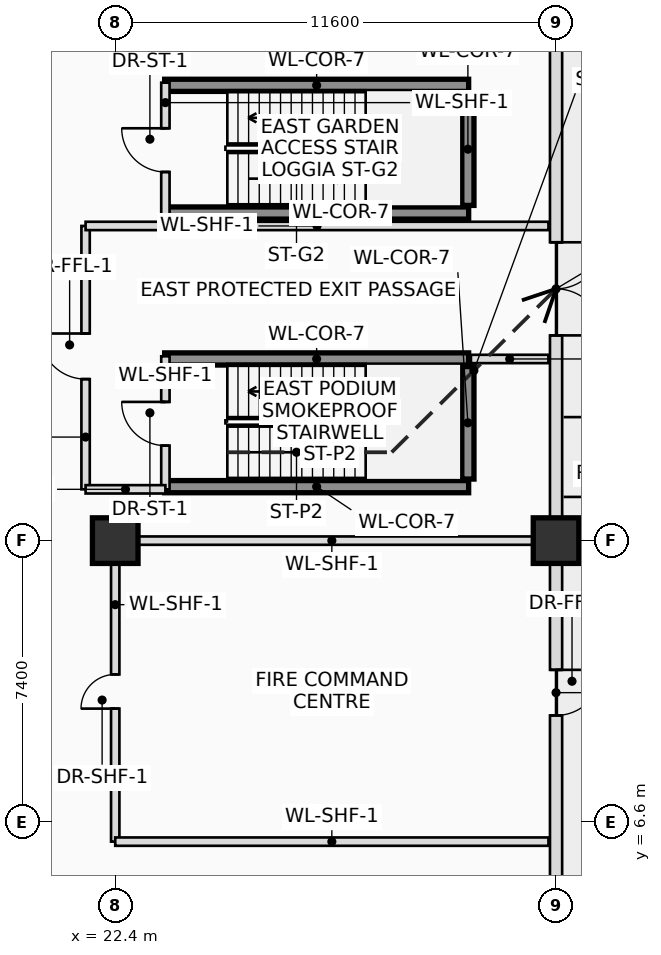
"""IFC4 building model, lengths in metres.
Left out: names, types, materials, properties, quantities, classifications, styles, units other than length and angle.
Written with IfcOpenShell. Run it as: python <this file> out.ifc"""

import sys

from ifc_helpers import new_model, si_unit, direction, frame, frame_2d, origin, origin_2d, place, context, subcontext, project, spatial, rectangle, extrude, source, transform, mapped, element, fill, save


model = new_model("IFC4")
c1 = context("Model", 3, precision=1e-05, world=origin(), true_north=direction((0.0, 1.0)))
c2 = subcontext(c1, "Body", "Model", "MODEL_VIEW")
j1 = project(units=[si_unit("LENGTHUNIT", "METRE"), si_unit("PLANEANGLEUNIT", "RADIAN")], contexts=[c1])
p1 = place(None, origin())
s1 = spatial("IfcSite", under=j1, at=p1, CompositionType="ELEMENT")
p2 = place(p1, origin())
s2 = spatial("IfcBuilding", under=s1, at=p2, CompositionType="ELEMENT")
p3 = place(p2, origin())
s3 = spatial("IfcBuildingStorey", under=s2, at=p3, CompositionType="ELEMENT", Elevation=0.0)
for number, where, z_axis, x_axis in (
    (1, (23.7, 18.78, 0.0), (0.0, 0.0, 1.0), (1.0, 0.0, 0.0)),
    (2, (23.7, 15.42, 0.0), (0.0, 0.0, 1.0), (1.0, 0.0, 0.0)),
):
    element("IfcWall", number, at=place(p3, frame(where, z_axis=z_axis, x_axis=x_axis)), inside=s3, PredefinedType="SHEAR", context=c2, shape_type="SweptSolid", body=[
        extrude(rectangle(XDim=8.0, YDim=0.32, at=frame_2d((4.0, 0.0))), origin(), (0.0, 0.0, 1.0), 4.5),
    ])
p4 = place(p3, frame((31.68, 15.62, 0.0), z_axis=(0.0, 0.0, 1.0), x_axis=(0.0, 1.0, 0.0)))
e3 = element("IfcWall", 3, at=p4, inside=s3, PredefinedType="SHEAR", context=c2, shape_type="SweptSolid", body=[
    extrude(rectangle(XDim=2.96, YDim=0.32, at=frame_2d((1.48, 0.0))), origin(), (0.0, 0.0, 1.0), 4.5),
])
for number, where, z_axis, x_axis in (
    (4, (23.7, 25.98, 0.0), (0.0, 0.0, 1.0), (1.0, 0.0, 0.0)),
    (5, (23.7, 22.62, 0.0), (0.0, 0.0, 1.0), (1.0, 0.0, 0.0)),
):
    element("IfcWall", number, at=place(p3, frame(where, z_axis=z_axis, x_axis=x_axis)), inside=s3, PredefinedType="SHEAR", context=c2, shape_type="SweptSolid", body=[
        extrude(rectangle(XDim=8.0, YDim=0.32, at=frame_2d((4.0, 0.0))), origin(), (0.0, 0.0, 1.0), 4.5),
    ])
p5 = place(p3, frame((31.68, 22.82, 0.0), z_axis=(0.0, 0.0, 1.0), x_axis=(0.0, 1.0, 0.0)))
e6 = element("IfcWall", 6, at=p5, inside=s3, PredefinedType="SHEAR", context=c2, shape_type="SweptSolid", body=[
    extrude(rectangle(XDim=2.96, YDim=0.32, at=frame_2d((1.48, 0.0))), origin(), (0.0, 0.0, 1.0), 4.5),
])
m1 = source(origin(), c2, "Body", "SweptSolid", [
    extrude(rectangle(XDim=1.2, YDim=1.2, at=origin_2d()), origin(), (0.0, 0.0, 1.0), 4.5),
])
for number, where, z_axis, x_axis in (
    (7, (22.4, 14.0, 0.0), (0.0, 0.0, 1.0), (1.0, 0.0, 0.0)),
    (8, (34.0, 14.0, 0.0), (0.0, 0.0, 1.0), (1.0, 0.0, 0.0)),
):
    element("IfcColumn", number, at=place(p3, frame(where, z_axis=z_axis, x_axis=x_axis)), inside=s3, PredefinedType="COLUMN", context=c2, shape_type="MappedRepresentation", body=[
        mapped(m1, transform((0.0, 0.0, 0.0), scale=1.0)),
    ])
p6 = place(p3, frame((34.0, 29.5, 0.0), z_axis=(0.0, 0.0, 1.0), x_axis=(0.0, -1.0, 0.0)))
e9 = element("IfcWall", 9, at=p6, inside=s3, PredefinedType="SOLIDWALL", context=c2, shape_type="SweptSolid", body=[
    extrude(rectangle(XDim=57.0, YDim=0.32, at=frame_2d((28.5, 0.0))), origin(), (0.0, 0.0, 1.0), 3.25),
])
p7 = place(p6, frame((7.65, 0.0, 0.0)))
e10 = element("IfcOpeningElement", 10, at=p7, cuts=e9, PredefinedType="OPENING", context=c2, shape_type="SweptSolid", body=[
    extrude(rectangle(XDim=2.45, YDim=2.55, at=frame_2d((1.225, 1.275))), frame((0.0, 0.17, 0.0), z_axis=(0.0, -1.0, 0.0), x_axis=(1.0, 0.0, 0.0)), (0.0, 0.0, 1.0), 0.34),
])
p8 = place(p6, frame((25.0, 0.0, 0.0)))
e11 = element("IfcOpeningElement", 11, at=p8, cuts=e9, PredefinedType="OPENING", context=c2, shape_type="SweptSolid", body=[
    extrude(rectangle(XDim=2.5, YDim=2.6, at=frame_2d((1.25, 1.3))), frame((0.0, 0.17, 0.0), z_axis=(0.0, -1.0, 0.0), x_axis=(1.0, 0.0, 0.0)), (0.0, 0.0, 1.0), 0.34),
])
p9 = place(p6, frame((18.9, 0.0, 0.0)))
e12 = element("IfcOpeningElement", 12, at=p9, cuts=e9, PredefinedType="OPENING", context=c2, shape_type="SweptSolid", body=[
    extrude(rectangle(XDim=1.2, YDim=2.2, at=frame_2d((0.6, 1.1))), frame((0.0, 0.17, 0.0), z_axis=(0.0, -1.0, 0.0), x_axis=(1.0, 0.0, 0.0)), (0.0, 0.0, 1.0), 0.34),
])
p10 = place(p6, frame((50.5, 0.0, 0.0)))
e13 = element("IfcOpeningElement", 13, at=p10, cuts=e9, PredefinedType="OPENING", context=c2, shape_type="SweptSolid", body=[
    extrude(rectangle(XDim=4.2, YDim=2.8, at=frame_2d((2.1, 1.4))), frame((0.0, 0.17, 0.0), z_axis=(0.0, -1.0, 0.0), x_axis=(1.0, 0.0, 0.0)), (0.0, 0.0, 1.0), 0.34),
])
p11 = place(p6, frame((35.0, 0.0, 0.4)))
e14 = element("IfcOpeningElement", 14, at=p11, cuts=e9, PredefinedType="OPENING", context=c2, shape_type="SweptSolid", body=[
    extrude(rectangle(XDim=2.4, YDim=2.4, at=frame_2d((1.2, 1.2))), frame((0.0, 0.17, 0.0), z_axis=(0.0, -1.0, 0.0), x_axis=(1.0, 0.0, 0.0)), (0.0, 0.0, 1.0), 0.34),
])
p12 = place(p3, frame((23.72, 15.35, 0.0), z_axis=(0.0, 0.0, 1.0), x_axis=(0.0, 1.0, 0.0)))
e15 = element("IfcWall", 15, at=p12, inside=s3, PredefinedType="PLUMBINGWALL", context=c2, shape_type="SweptSolid", body=[
    extrude(rectangle(XDim=3.5, YDim=0.22, at=frame_2d((1.75, 0.0))), origin(), (0.0, 0.0, 1.0), 4.17),
])
p13 = place(p12, frame((1.15, 0.0, 0.0)))
e16 = element("IfcOpeningElement", 16, at=p13, cuts=e15, PredefinedType="OPENING", context=c2, shape_type="SweptSolid", body=[
    extrude(rectangle(XDim=1.15, YDim=2.15, at=frame_2d((0.575, 1.075))), frame((0.0, 0.12, 0.0), z_axis=(0.0, -1.0, 0.0), x_axis=(1.0, 0.0, 0.0)), (0.0, 0.0, 1.0), 0.24),
])
p14 = place(p3, frame((23.72, 22.55, 0.0), z_axis=(0.0, 0.0, 1.0), x_axis=(0.0, 1.0, 0.0)))
e17 = element("IfcWall", 17, at=p14, inside=s3, PredefinedType="PLUMBINGWALL", context=c2, shape_type="SweptSolid", body=[
    extrude(rectangle(XDim=3.5, YDim=0.22, at=frame_2d((1.75, 0.0))), origin(), (0.0, 0.0, 1.0), 4.17),
])
p15 = place(p14, frame((1.15, 0.0, 0.0)))
e18 = element("IfcOpeningElement", 18, at=p15, cuts=e17, PredefinedType="OPENING", context=c2, shape_type="SweptSolid", body=[
    extrude(rectangle(XDim=1.15, YDim=2.15, at=frame_2d((0.575, 1.075))), frame((0.0, 0.12, 0.0), z_axis=(0.0, -1.0, 0.0), x_axis=(1.0, 0.0, 0.0)), (0.0, 0.0, 1.0), 0.24),
])
p16 = place(p3, frame((21.62, 15.35, 0.0), z_axis=(0.0, 0.0, 1.0), x_axis=(0.0, 1.0, 0.0)))
e19 = element("IfcWall", 19, at=p16, inside=s3, PredefinedType="PLUMBINGWALL", context=c2, shape_type="SweptSolid", body=[
    extrude(rectangle(XDim=6.93, YDim=0.22, at=frame_2d((3.465, 0.0))), origin(), (0.0, 0.0, 1.0), 4.17),
])
p17 = place(p16, frame((2.9, 0.0, 0.0)))
e20 = element("IfcOpeningElement", 20, at=p17, cuts=e19, PredefinedType="OPENING", context=c2, shape_type="SweptSolid", body=[
    extrude(rectangle(XDim=1.2, YDim=2.2, at=frame_2d((0.6, 1.1))), frame((0.0, 0.12, 0.0), z_axis=(0.0, -1.0, 0.0), x_axis=(1.0, 0.0, 0.0)), (0.0, 0.0, 1.0), 0.24),
])
p18 = place(p3, frame((21.62, 15.35, 0.0), z_axis=(0.0, 0.0, 1.0), x_axis=(1.0, 0.0, 0.0)))
e21 = element("IfcWall", 21, at=p18, inside=s3, PredefinedType="PLUMBINGWALL", context=c2, shape_type="SweptSolid", body=[
    extrude(rectangle(XDim=2.1, YDim=0.22, at=frame_2d((1.05, 0.0))), origin(), (0.0, 0.0, 1.0), 3.375),
])
p19 = place(p3, frame((31.76, 18.78, 0.0), z_axis=(0.0, 0.0, 1.0), x_axis=(1.0, 0.0, 0.0)))
e22 = element("IfcWall", 22, at=p19, inside=s3, PredefinedType="PLUMBINGWALL", context=c2, shape_type="SweptSolid", body=[
    extrude(rectangle(XDim=2.04, YDim=0.22, at=frame_2d((1.02, 0.0))), origin(), (0.0, 0.0, 1.0), 4.17),
])
p20 = place(p3, frame((21.62, 22.28, 0.0), z_axis=(0.0, 0.0, 1.0), x_axis=(1.0, 0.0, 0.0)))
e23 = element("IfcWall", 23, at=p20, inside=s3, PredefinedType="PLUMBINGWALL", context=c2, shape_type="SweptSolid", body=[
    extrude(rectangle(XDim=12.18, YDim=0.22, at=frame_2d((6.09, 0.0))), origin(), (0.0, 0.0, 1.0), 3.375),
])
p21 = place(p3, frame((22.4, 6.08, 0.0), z_axis=(0.0, 0.0, 1.0), x_axis=(0.0, 1.0, 0.0)))
e24 = element("IfcWall", 24, at=p21, inside=s3, PredefinedType="PLUMBINGWALL", context=c2, shape_type="SweptSolid", body=[
    extrude(rectangle(XDim=7.92, YDim=0.22, at=frame_2d((3.96, 0.0))), origin(), (0.0, 0.0, 1.0), 3.375),
])
p22 = place(p21, frame((3.5, 0.0, 0.0)))
e25 = element("IfcOpeningElement", 25, at=p22, cuts=e24, PredefinedType="OPENING", context=c2, shape_type="SweptSolid", body=[
    extrude(rectangle(XDim=0.9, YDim=2.05, at=frame_2d((0.45, 1.025))), frame((0.0, 0.12, 0.0), z_axis=(0.0, -1.0, 0.0), x_axis=(1.0, 0.0, 0.0)), (0.0, 0.0, 1.0), 0.24),
])
for number, where, z_axis, x_axis in (
    (26, (22.4, 14.0, 0.0), (0.0, 0.0, 1.0), (1.0, 0.0, 0.0)),
    (27, (22.4, 6.08, 0.0), (0.0, 0.0, 1.0), (1.0, 0.0, 0.0)),
):
    element("IfcWall", number, at=place(p3, frame(where, z_axis=z_axis, x_axis=x_axis)), inside=s3, PredefinedType="PLUMBINGWALL", context=c2, shape_type="SweptSolid", body=[
        extrude(rectangle(XDim=11.4, YDim=0.22, at=frame_2d((5.7, 0.0))), origin(), (0.0, 0.0, 1.0), 3.375),
    ])
p23 = place(p7, origin())
e28 = element("IfcDoor", 28, at=p23, inside=s3, OperationType="DOUBLE_DOOR_SINGLE_SWING", PredefinedType="DOOR", context=c2, shape_type="SweptSolid", body=[
    extrude(rectangle(XDim=2.45, YDim=2.55, at=frame_2d((1.225, 1.275))), frame((0.0, 0.025, 0.0), z_axis=(0.0, -1.0, 0.0), x_axis=(1.0, 0.0, 0.0)), (0.0, 0.0, 1.0), 0.05),
])
fill(e10, e28)
p24 = place(p9, origin())
e29 = element("IfcDoor", 29, at=p24, inside=s3, OperationType="SINGLE_SWING_LEFT", PredefinedType="DOOR", context=c2, shape_type="SweptSolid", body=[
    extrude(rectangle(XDim=1.2, YDim=2.2, at=frame_2d((0.6, 1.1))), frame((0.0, 0.025, 0.0), z_axis=(0.0, -1.0, 0.0), x_axis=(1.0, 0.0, 0.0)), (0.0, 0.0, 1.0), 0.05),
])
fill(e12, e29)
p25 = place(p13, origin())
e30 = element("IfcDoor", 30, at=p25, inside=s3, OperationType="SINGLE_SWING_RIGHT", PredefinedType="DOOR", context=c2, shape_type="SweptSolid", body=[
    extrude(rectangle(XDim=1.15, YDim=2.15, at=frame_2d((0.575, 1.075))), frame((0.0, 0.025, 0.0), z_axis=(0.0, -1.0, 0.0), x_axis=(1.0, 0.0, 0.0)), (0.0, 0.0, 1.0), 0.05),
])
fill(e16, e30)
p26 = place(p15, origin())
e31 = element("IfcDoor", 31, at=p26, inside=s3, OperationType="SINGLE_SWING_RIGHT", PredefinedType="DOOR", context=c2, shape_type="SweptSolid", body=[
    extrude(rectangle(XDim=1.15, YDim=2.15, at=frame_2d((0.575, 1.075))), frame((0.0, 0.025, 0.0), z_axis=(0.0, -1.0, 0.0), x_axis=(1.0, 0.0, 0.0)), (0.0, 0.0, 1.0), 0.05),
])
fill(e18, e31)
p27 = place(p17, origin())
e32 = element("IfcDoor", 32, at=p27, inside=s3, OperationType="SINGLE_SWING_RIGHT", PredefinedType="DOOR", context=c2, shape_type="SweptSolid", body=[
    extrude(rectangle(XDim=1.2, YDim=2.2, at=frame_2d((0.6, 1.1))), frame((0.0, 0.025, 0.0), z_axis=(0.0, -1.0, 0.0), x_axis=(1.0, 0.0, 0.0)), (0.0, 0.0, 1.0), 0.05),
])
fill(e20, e32)
p28 = place(p22, origin())
e33 = element("IfcDoor", 33, at=p28, inside=s3, OperationType="SINGLE_SWING_LEFT", PredefinedType="DOOR", context=c2, shape_type="SweptSolid", body=[
    extrude(rectangle(XDim=0.9, YDim=2.05, at=frame_2d((0.45, 1.025))), frame((0.0, 0.025, 0.0), z_axis=(0.0, -1.0, 0.0), x_axis=(1.0, 0.0, 0.0)), (0.0, 0.0, 1.0), 0.05),
])
fill(e25, e33)
save(model, sys.argv[1])
